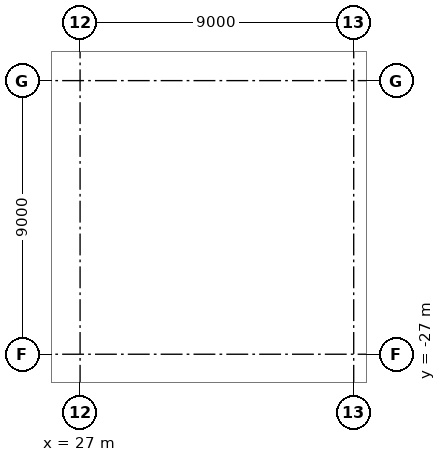
"""IFC4 building model, lengths in metres.
Left out: names, types, materials, properties, quantities, classifications, styles, units other than length and angle.
Written with IfcOpenShell. Run it as: python <this file> out.ifc"""

import sys

from ifc_helpers import new_model, si_unit, direction, frame, frame_2d, origin, origin_2d, place, context, subcontext, project, spatial, rectangle, extrude, element, fill, save


model = new_model("IFC4")
c1 = context("Model", 3, precision=1e-05, world=origin(), true_north=direction((0.0, 1.0)))
c2 = subcontext(c1, "Body", "Model", "MODEL_VIEW")
j1 = project(units=[si_unit("LENGTHUNIT", "METRE"), si_unit("PLANEANGLEUNIT", "RADIAN")], contexts=[c1])
p1 = place(None, origin())
s1 = spatial("IfcSite", under=j1, at=p1, CompositionType="ELEMENT")
p2 = place(p1, origin())
s2 = spatial("IfcBuilding", under=s1, at=p2, CompositionType="ELEMENT")
p3 = place(p2, origin())
s3 = spatial("IfcBuildingStorey", under=s2, at=p3, CompositionType="ELEMENT", Elevation=0.0)
p4 = place(p3, frame((27.0, -27.0, 0.0), z_axis=(0.0, 0.0, 1.0), x_axis=(1.0, 0.0, 0.0)))
e1 = element("IfcColumn", 1, at=p4, inside=s3, PredefinedType="COLUMN", context=c2, shape_type="SweptSolid", body=[
    extrude(rectangle(XDim=0.875, YDim=0.875, at=origin_2d()), origin(), (0.0, 0.0, 1.0), 4.5),
])
p5 = place(p3, frame((27.0, -18.0, 0.0), z_axis=(0.0, 0.0, 1.0), x_axis=(1.0, 0.0, 0.0)))
e2 = element("IfcColumn", 2, at=p5, inside=s3, PredefinedType="COLUMN", context=c2, shape_type="SweptSolid", body=[
    extrude(rectangle(XDim=0.85, YDim=0.85, at=origin_2d()), origin(), (0.0, 0.0, 1.0), 4.5),
])
for number, where, z_axis, x_axis in (
    (3, (34.6, -27.0, 0.0), (0.0, 0.0, 1.0), (1.0, 0.0, 0.0)),
    (4, (34.6, -18.0, 0.0), (0.0, 0.0, 1.0), (1.0, 0.0, 0.0)),
):
    element("IfcColumn", number, at=place(p3, frame(where, z_axis=z_axis, x_axis=x_axis)), inside=s3, PredefinedType="COLUMN", context=c2, shape_type="SweptSolid", body=[
        extrude(rectangle(XDim=0.7, YDim=0.7, at=origin_2d()), origin(), (0.0, 0.0, 1.0), 4.5),
    ])
p6 = place(p3, frame((27.531, -20.979, 0.0), z_axis=(0.0, 0.0, 1.0), x_axis=(0.991001197216, 0.133853005627, 0.0)))
e5 = element("IfcColumn", 5, at=p6, inside=s3, PredefinedType="COLUMN", context=c2, shape_type="SweptSolid", body=[
    extrude(rectangle(XDim=2.3, YDim=2.3, at=origin_2d()), origin(), (0.0, 0.0, 1.0), 4.5),
])
p7 = place(p3, frame((17.925, -27.0, 0.0), z_axis=(0.0, 0.0, 1.0), x_axis=(1.0, 0.0, 0.0)))
e6 = element("IfcWall", 6, at=p7, inside=s3, PredefinedType="PARTITIONING", context=c2, shape_type="SweptSolid", body=[
    extrude(rectangle(XDim=8.575, YDim=0.15, at=frame_2d((4.288, 0.0))), origin(), (0.0, 0.0, 1.0), 4.1),
])
p8 = place(p7, frame((4.075, 0.0, 0.0)))
e7 = element("IfcOpeningElement", 7, at=p8, cuts=e6, PredefinedType="OPENING", context=c2, shape_type="SweptSolid", body=[
    extrude(rectangle(XDim=1.0, YDim=2.1, at=frame_2d((0.5, 1.05))), frame((0.0, 0.085, 0.0), z_axis=(0.0, -1.0, 0.0), x_axis=(1.0, 0.0, 0.0)), (0.0, 0.0, 1.0), 0.17),
])
p9 = place(p3, frame((27.5, -27.0, 0.0), z_axis=(0.0, 0.0, 1.0), x_axis=(1.0, 0.0, 0.0)))
e8 = element("IfcWall", 8, at=p9, inside=s3, PredefinedType="PARTITIONING", context=c2, shape_type="SweptSolid", body=[
    extrude(rectangle(XDim=6.6, YDim=0.1, at=frame_2d((3.3, 0.0))), origin(), (0.0, 0.0, 1.0), 4.1),
])
p10 = place(p3, frame((35.1, -27.0, 0.0), z_axis=(0.0, 0.0, 1.0), x_axis=(1.0, 0.0, 0.0)))
e9 = element("IfcWall", 9, at=p10, inside=s3, PredefinedType="PARTITIONING", context=c2, shape_type="SweptSolid", body=[
    extrude(rectangle(XDim=0.9, YDim=0.1, at=frame_2d((0.45, 0.0))), origin(), (0.0, 0.0, 1.0), 4.1),
])
p11 = place(p3, frame((27.5, -18.0, 0.0), z_axis=(0.0, 0.0, 1.0), x_axis=(1.0, 0.0, 0.0)))
e10 = element("IfcWall", 10, at=p11, inside=s3, PredefinedType="PARTITIONING", context=c2, shape_type="SweptSolid", body=[
    extrude(rectangle(XDim=6.6, YDim=0.15, at=frame_2d((3.3, 0.0))), origin(), (0.0, 0.0, 1.0), 4.1),
])
p12 = place(p11, frame((3.5, 0.0, 0.0)))
e11 = element("IfcOpeningElement", 11, at=p12, cuts=e10, PredefinedType="OPENING", context=c2, shape_type="SweptSolid", body=[
    extrude(rectangle(XDim=1.0, YDim=2.1, at=frame_2d((0.5, 1.05))), frame((0.0, 0.085, 0.0), z_axis=(0.0, -1.0, 0.0), x_axis=(1.0, 0.0, 0.0)), (0.0, 0.0, 1.0), 0.17),
])
p13 = place(p3, frame((35.1, -18.0, 0.0), z_axis=(0.0, 0.0, 1.0), x_axis=(1.0, 0.0, 0.0)))
e12 = element("IfcWall", 12, at=p13, inside=s3, PredefinedType="PARTITIONING", context=c2, shape_type="SweptSolid", body=[
    extrude(rectangle(XDim=0.9, YDim=0.15, at=frame_2d((0.45, 0.0))), origin(), (0.0, 0.0, 1.0), 4.1),
])
p14 = place(p3, frame((27.0, -26.5, 0.0), z_axis=(0.0, 0.0, 1.0), x_axis=(0.0, 1.0, 0.0)))
e13 = element("IfcWall", 13, at=p14, inside=s3, PredefinedType="PARTITIONING", context=c2, shape_type="SweptSolid", body=[
    extrude(rectangle(XDim=4.284, YDim=0.15, at=frame_2d((2.142, 0.0))), origin(), (0.0, 0.0, 1.0), 4.1),
])
p15 = place(p3, frame((27.0, -19.742, 0.0), z_axis=(0.0, 0.0, 1.0), x_axis=(0.0, 1.0, 0.0)))
e14 = element("IfcWall", 14, at=p15, inside=s3, PredefinedType="PARTITIONING", context=c2, shape_type="SweptSolid", body=[
    extrude(rectangle(XDim=1.242, YDim=0.15, at=frame_2d((0.621, 0.0))), origin(), (0.0, 0.0, 1.0), 4.1),
])
p16 = place(p3, frame((35.7, -30.876, 0.0), z_axis=(0.0, 0.0, 1.0), x_axis=(0.0, 1.0, 0.0)))
e15 = element("IfcWall", 15, at=p16, inside=s3, PredefinedType="STANDARD", context=c2, shape_type="SweptSolid", body=[
    extrude(rectangle(XDim=6.676, YDim=0.6, at=frame_2d((3.338, 0.0))), origin(), (0.0, 0.0, 1.0), 4.1),
])
p17 = place(p16, frame((1.152, 0.0, 0.45)))
e16 = element("IfcOpeningElement", 16, at=p17, cuts=e15, PredefinedType="OPENING", context=c2, shape_type="SweptSolid", body=[
    extrude(rectangle(XDim=2.0, YDim=3.2, at=frame_2d((1.0, 1.6))), frame((0.0, 0.31, 0.0), z_axis=(0.0, -1.0, 0.0), x_axis=(1.0, 0.0, 0.0)), (0.0, 0.0, 1.0), 0.62),
])
p18 = place(p3, frame((35.7, -24.2, 0.0), z_axis=(0.0, 0.0, 1.0), x_axis=(0.0, 1.0, 0.0)))
e17 = element("IfcWall", 17, at=p18, inside=s3, PredefinedType="STANDARD", context=c2, shape_type="SweptSolid", body=[
    extrude(rectangle(XDim=3.4, YDim=0.6, at=frame_2d((1.7, 0.0))), origin(), (0.0, 0.0, 1.0), 4.1),
])
p19 = place(p18, frame((0.5, 0.0, 0.0)))
e18 = element("IfcOpeningElement", 18, at=p19, cuts=e17, PredefinedType="OPENING", context=c2, shape_type="SweptSolid", body=[
    extrude(rectangle(XDim=2.4, YDim=3.0, at=frame_2d((1.2, 1.5))), frame((0.0, 0.31, 0.0), z_axis=(0.0, -1.0, 0.0), x_axis=(1.0, 0.0, 0.0)), (0.0, 0.0, 1.0), 0.62),
])
p20 = place(p3, frame((35.7, -20.8, 0.0), z_axis=(0.0, 0.0, 1.0), x_axis=(0.0, 1.0, 0.0)))
e19 = element("IfcWall", 19, at=p20, inside=s3, PredefinedType="STANDARD", context=c2, shape_type="SweptSolid", body=[
    extrude(rectangle(XDim=3.3, YDim=0.6, at=frame_2d((1.65, 0.0))), origin(), (0.0, 0.0, 1.0), 4.1),
])
p21 = place(p3, frame((35.7, -14.1, 0.0), z_axis=(0.0, 0.0, 1.0), x_axis=(0.0, -1.0, 0.0)))
e20 = element("IfcWall", 20, at=p21, inside=s3, PredefinedType="STANDARD", context=c2, shape_type="SweptSolid", body=[
    extrude(rectangle(XDim=3.4, YDim=0.6, at=frame_2d((1.7, 0.0))), origin(), (0.0, 0.0, 1.0), 4.1),
])
p22 = place(p21, frame((0.5, 0.0, 0.0)))
e21 = element("IfcOpeningElement", 21, at=p22, cuts=e20, PredefinedType="OPENING", context=c2, shape_type="SweptSolid", body=[
    extrude(rectangle(XDim=2.4, YDim=2.4, at=frame_2d((1.2, 1.2))), frame((0.0, 0.31, 0.0), z_axis=(0.0, -1.0, 0.0), x_axis=(1.0, 0.0, 0.0)), (0.0, 0.0, 1.0), 0.62),
])
p23 = place(p12, origin())
e22 = element("IfcDoor", 22, at=p23, inside=s3, OperationType="SINGLE_SWING_RIGHT", PredefinedType="DOOR", context=c2, shape_type="SweptSolid", body=[
    extrude(rectangle(XDim=1.0, YDim=2.1, at=frame_2d((0.5, 1.05))), frame((0.0, 0.025, 0.0), z_axis=(0.0, -1.0, 0.0), x_axis=(1.0, 0.0, 0.0)), (0.0, 0.0, 1.0), 0.05),
])
fill(e11, e22)
p24 = place(p17, origin())
e23 = element("IfcWindow", 23, at=p24, inside=s3, PartitioningType="SINGLE_PANEL", PredefinedType="WINDOW", context=c2, shape_type="SweptSolid", body=[
    extrude(rectangle(XDim=2.0, YDim=3.2, at=frame_2d((1.0, 1.6))), frame((0.0, 0.03, 0.0), z_axis=(0.0, -1.0, 0.0), x_axis=(1.0, 0.0, 0.0)), (0.0, 0.0, 1.0), 0.06),
])
fill(e16, e23)
p25 = place(p19, origin())
e24 = element("IfcDoor", 24, at=p25, inside=s3, OperationType="ROLLINGUP", PredefinedType="DOOR", context=c2, shape_type="SweptSolid", body=[
    extrude(rectangle(XDim=2.4, YDim=3.0, at=frame_2d((1.2, 1.5))), frame((0.0, 0.025, 0.0), z_axis=(0.0, -1.0, 0.0), x_axis=(1.0, 0.0, 0.0)), (0.0, 0.0, 1.0), 0.05),
])
fill(e18, e24)
save(model, sys.argv[1])
